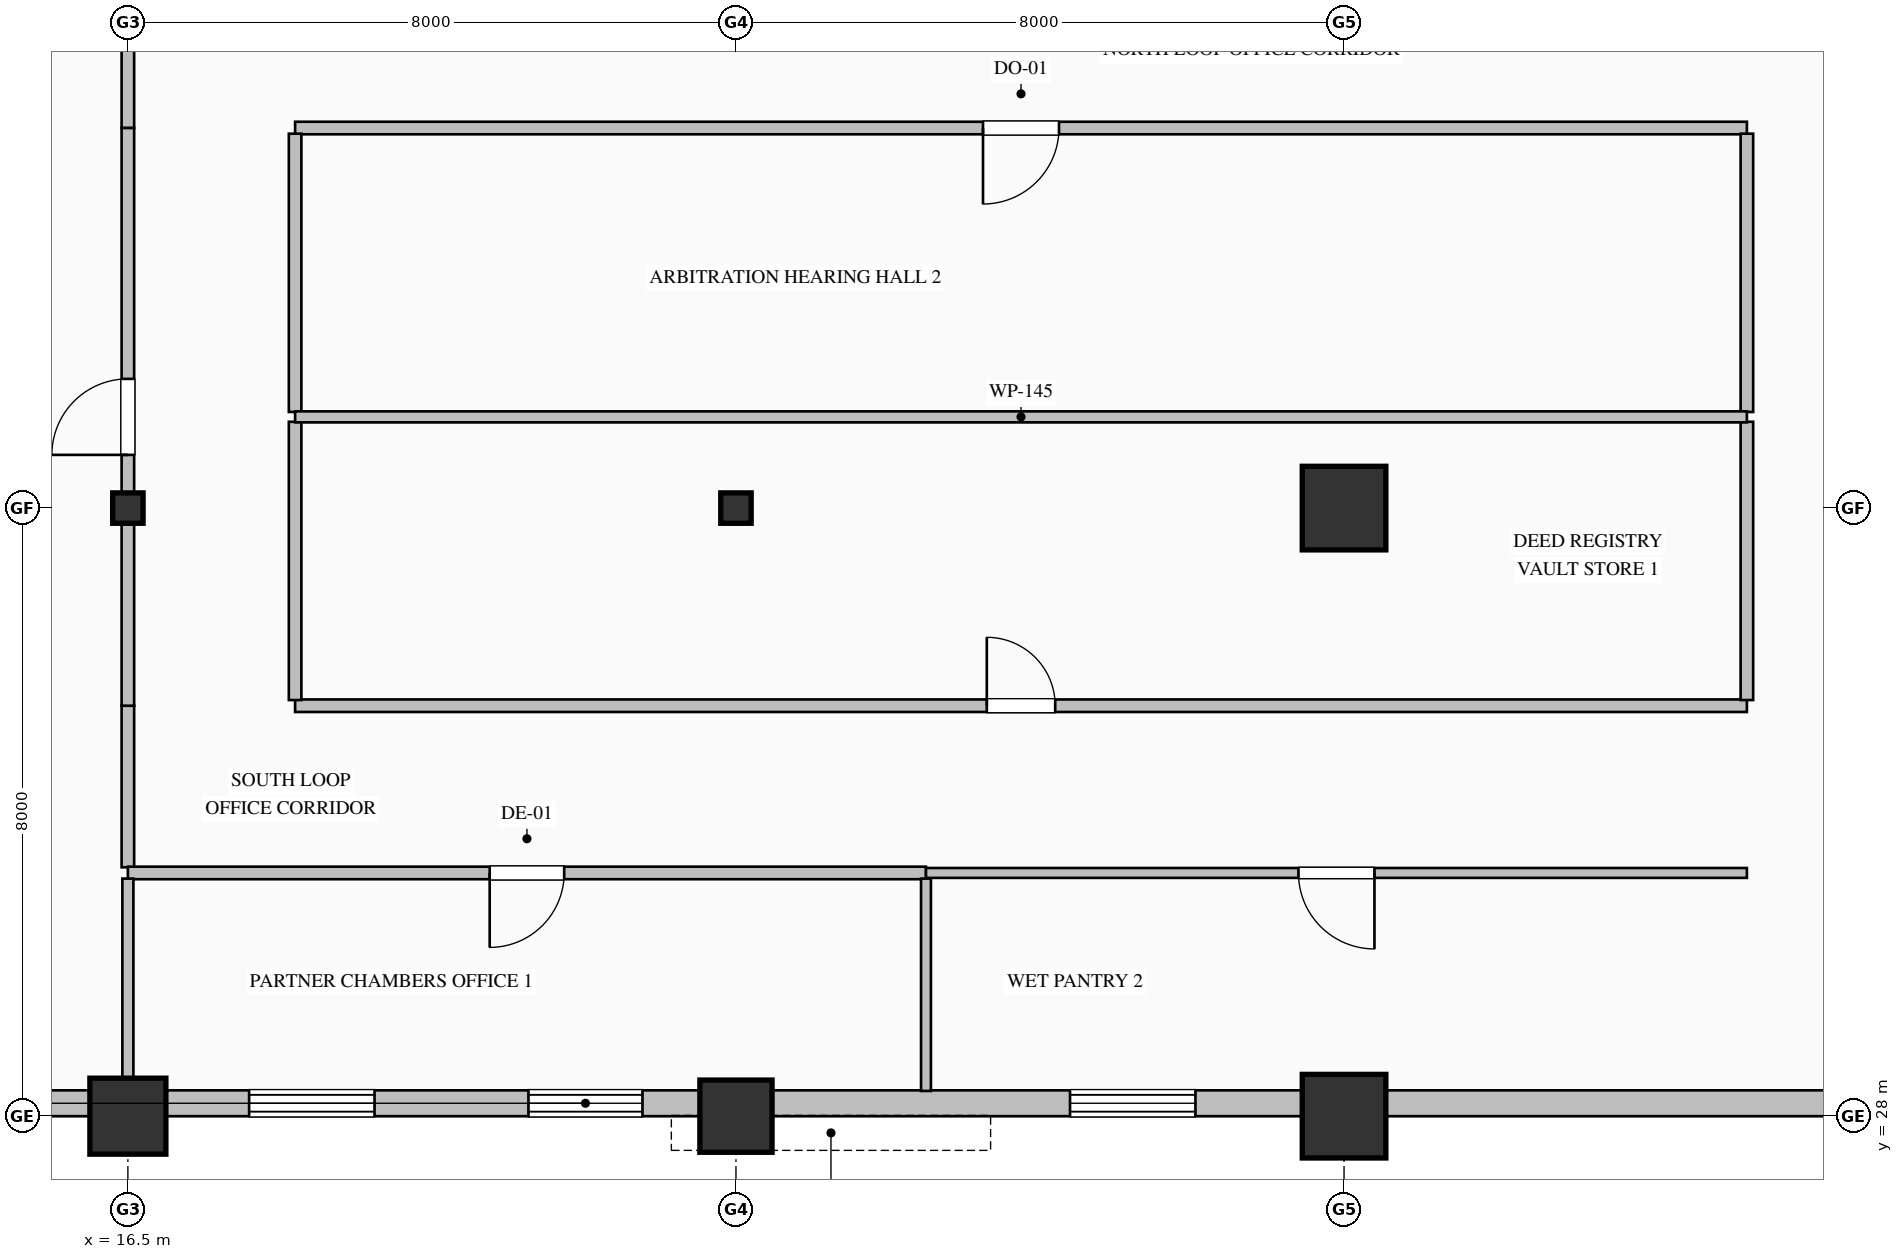
"""IFC4 building model, lengths in metres.
Left out: names, types, materials, properties, quantities, classifications, styles, units other than length and angle.
Written with IfcOpenShell. Run it as: python <this file> out.ifc"""

import sys

from ifc_helpers import new_model, si_unit, direction, frame, frame_2d, origin, origin_2d, place, context, subcontext, project, spatial, rectangle, hollow_rectangle, hollow_circle, i_section, extrude, element, fill, save


model = new_model("IFC4")
c1 = context("Model", 3, precision=1e-05, world=origin(), true_north=direction((0.0, 1.0)))
c2 = subcontext(c1, "Body", "Model", "MODEL_VIEW")
j1 = project(units=[si_unit("LENGTHUNIT", "METRE"), si_unit("PLANEANGLEUNIT", "RADIAN")], contexts=[c1])
p1 = place(None, origin())
s1 = spatial("IfcSite", under=j1, at=p1, CompositionType="ELEMENT")
p2 = place(p1, origin())
s2 = spatial("IfcBuilding", under=s1, at=p2, CompositionType="ELEMENT")
p3 = place(p2, frame((0.0, 0.0, 191.0)))
s3 = spatial("IfcBuildingStorey", under=s2, at=p3, CompositionType="ELEMENT", Elevation=191.0)
p4 = place(p3, frame((16.5, 28.0, 0.0), z_axis=(0.0, 0.0, 1.0), x_axis=(1.0, 0.0, 0.0)))
e1 = element("IfcColumn", 1, at=p4, inside=s3, PredefinedType="COLUMN", context=c2, shape_type="SweptSolid", body=[
    extrude(hollow_circle(Radius=0.5, WallThickness=0.036, at=origin_2d()), origin(), (0.0, 0.0, 1.0), 4.0),
])
p5 = place(p3, frame((16.5, 36.0, 0.0), z_axis=(0.0, 0.0, 1.0), x_axis=(1.0, 0.0, 0.0)))
e2 = element("IfcColumn", 2, at=p5, inside=s3, PredefinedType="COLUMN", context=c2, shape_type="SweptSolid", body=[
    extrude(i_section(OverallWidth=0.4, OverallDepth=0.4, WebThickness=0.013, FlangeThickness=0.021, FilletRadius=0.022, at=origin_2d()), origin(), (0.0, 0.0, 1.0), 4.0),
])
p6 = place(p3, frame((24.5, 28.0, 0.0), z_axis=(0.0, 0.0, 1.0), x_axis=(1.0, 0.0, 0.0)))
e3 = element("IfcColumn", 3, at=p6, inside=s3, PredefinedType="COLUMN", context=c2, shape_type="SweptSolid", body=[
    extrude(hollow_rectangle(XDim=0.95, YDim=0.95, WallThickness=0.036, at=origin_2d()), origin(), (0.0, 0.0, 1.0), 4.0),
])
p7 = place(p3, frame((24.5, 36.0, 0.0), z_axis=(0.0, 0.0, 1.0), x_axis=(1.0, 0.0, 0.0)))
e4 = element("IfcColumn", 4, at=p7, inside=s3, PredefinedType="COLUMN", context=c2, shape_type="SweptSolid", body=[
    extrude(i_section(OverallWidth=0.4, OverallDepth=0.4, WebThickness=0.013, FlangeThickness=0.021, FilletRadius=0.022, at=origin_2d()), origin(), (0.0, 0.0, 1.0), 4.0),
])
for number, where, z_axis, x_axis in (
    (5, (32.5, 28.0, 0.0), (0.0, 0.0, 1.0), (1.0, 0.0, 0.0)),
    (6, (32.5, 36.0, 0.0), (0.0, 0.0, 1.0), (1.0, 0.0, 0.0)),
):
    element("IfcColumn", number, at=place(p3, frame(where, z_axis=z_axis, x_axis=x_axis)), inside=s3, PredefinedType="COLUMN", context=c2, shape_type="SweptSolid", body=[
        extrude(hollow_rectangle(XDim=1.1, YDim=1.1, WallThickness=0.04, at=origin_2d()), origin(), (0.0, 0.0, 1.0), 4.0),
    ])
p8 = place(p3, frame((40.52, 28.17, 0.0), z_axis=(0.0, 0.0, 1.0), x_axis=(-1.0, 0.0, 0.0)))
e7 = element("IfcWall", 7, at=p8, inside=s3, PredefinedType="SOLIDWALL", context=c2, shape_type="SweptSolid", body=[
    extrude(rectangle(XDim=27.52, YDim=0.34, at=frame_2d((13.76, 0.0))), origin(), (0.0, 0.0, 1.0), 3.05),
])
p9 = place(p8, frame((9.975, 0.0, 0.85)))
e8 = element("IfcOpeningElement", 8, at=p9, cuts=e7, PredefinedType="OPENING", context=c2, shape_type="SweptSolid", body=[
    extrude(rectangle(XDim=1.65, YDim=1.95, at=frame_2d((0.825, 0.975))), frame((0.0, 0.18, 0.0), z_axis=(0.0, -1.0, 0.0), x_axis=(1.0, 0.0, 0.0)), (0.0, 0.0, 1.0), 0.36),
])
p10 = place(p8, frame((17.25, 0.0, 0.85)))
e9 = element("IfcOpeningElement", 9, at=p10, cuts=e7, PredefinedType="OPENING", context=c2, shape_type="SweptSolid", body=[
    extrude(rectangle(XDim=1.5, YDim=1.95, at=frame_2d((0.75, 0.975))), frame((0.0, 0.18, 0.0), z_axis=(0.0, -1.0, 0.0), x_axis=(1.0, 0.0, 0.0)), (0.0, 0.0, 1.0), 0.36),
])
p11 = place(p8, frame((20.775, 0.0, 0.85)))
e10 = element("IfcOpeningElement", 10, at=p11, cuts=e7, PredefinedType="OPENING", context=c2, shape_type="SweptSolid", body=[
    extrude(rectangle(XDim=1.65, YDim=1.95, at=frame_2d((0.825, 0.975))), frame((0.0, 0.18, 0.0), z_axis=(0.0, -1.0, 0.0), x_axis=(1.0, 0.0, 0.0)), (0.0, 0.0, 1.0), 0.36),
])
p12 = place(p3, frame((18.7, 33.4, 0.0), z_axis=(0.0, 0.0, 1.0), x_axis=(1.0, 0.0, 0.0)))
e11 = element("IfcWall", 11, at=p12, inside=s3, PredefinedType="PARTITIONING", context=c2, shape_type="SweptSolid", body=[
    extrude(rectangle(XDim=19.1, YDim=0.165, at=frame_2d((9.55, 0.0))), origin(), (0.0, 0.0, 1.0), 3.65),
])
p13 = place(p12, frame((9.1, 0.0, 0.0)))
e12 = element("IfcOpeningElement", 12, at=p13, cuts=e11, PredefinedType="OPENING", context=c2, shape_type="SweptSolid", body=[
    extrude(rectangle(XDim=0.9, YDim=2.15, at=frame_2d((0.45, 1.075))), frame((0.0, 0.093, 0.0), z_axis=(0.0, -1.0, 0.0), x_axis=(1.0, 0.0, 0.0)), (0.0, 0.0, 1.0), 0.185),
])
p14 = place(p3, frame((16.5, 31.274, 0.0), z_axis=(0.0, 0.0, 1.0), x_axis=(0.0, 1.0, 0.0)))
e13 = element("IfcWall", 13, at=p14, inside=s3, PredefinedType="PARTITIONING", context=c2, shape_type="SweptSolid", body=[
    extrude(rectangle(XDim=2.125, YDim=0.165, at=frame_2d((1.063, 0.0))), origin(), (0.0, 0.0, 1.0), 3.042),
])
p15 = place(p3, frame((27.0, 31.2, 0.0), z_axis=(0.0, 0.0, 1.0), x_axis=(-1.0, 0.0, 0.0)))
e14 = element("IfcWall", 14, at=p15, inside=s3, PredefinedType="PARTITIONING", context=c2, shape_type="SweptSolid", body=[
    extrude(rectangle(XDim=10.5, YDim=0.165, at=frame_2d((5.25, 0.0))), origin(), (0.0, 0.0, 1.0), 3.65),
])
p16 = place(p15, frame((4.76, 0.0, 0.0)))
e15 = element("IfcOpeningElement", 15, at=p16, cuts=e14, PredefinedType="OPENING", context=c2, shape_type="SweptSolid", body=[
    extrude(rectangle(XDim=0.98, YDim=2.25, at=frame_2d((0.49, 1.125))), frame((0.0, 0.093, 0.0), z_axis=(0.0, -1.0, 0.0), x_axis=(1.0, 0.0, 0.0)), (0.0, 0.0, 1.0), 0.185),
])
p17 = place(p3, frame((37.8, 31.2, 0.0), z_axis=(0.0, 0.0, 1.0), x_axis=(-1.0, 0.0, 0.0)))
e16 = element("IfcWall", 16, at=p17, inside=s3, PredefinedType="PARTITIONING", context=c2, shape_type="SweptSolid", body=[
    extrude(rectangle(XDim=10.8, YDim=0.13, at=frame_2d((5.4, 0.0))), origin(), (0.0, 0.0, 1.0), 3.65),
])
p18 = place(p17, frame((4.9, 0.0, 0.0)))
e17 = element("IfcOpeningElement", 17, at=p18, cuts=e16, PredefinedType="OPENING", context=c2, shape_type="SweptSolid", body=[
    extrude(rectangle(XDim=1.0, YDim=2.15, at=frame_2d((0.5, 1.075))), frame((0.0, 0.075, 0.0), z_axis=(0.0, -1.0, 0.0), x_axis=(1.0, 0.0, 0.0)), (0.0, 0.0, 1.0), 0.15),
])
p19 = place(p3, frame((37.8, 41.0, 0.0), z_axis=(0.0, 0.0, 1.0), x_axis=(-1.0, 0.0, 0.0)))
e18 = element("IfcWall", 18, at=p19, inside=s3, PredefinedType="PARTITIONING", context=c2, shape_type="SweptSolid", body=[
    extrude(rectangle(XDim=19.1, YDim=0.165, at=frame_2d((9.55, 0.0))), origin(), (0.0, 0.0, 1.0), 3.65),
])
p20 = place(p19, frame((9.05, 0.0, 0.0)))
e19 = element("IfcOpeningElement", 19, at=p20, cuts=e18, PredefinedType="OPENING", context=c2, shape_type="SweptSolid", body=[
    extrude(rectangle(XDim=1.0, YDim=2.15, at=frame_2d((0.5, 1.075))), frame((0.0, 0.093, 0.0), z_axis=(0.0, -1.0, 0.0), x_axis=(1.0, 0.0, 0.0)), (0.0, 0.0, 1.0), 0.185),
])
p21 = place(p3, frame((16.5, 41.0, 0.0), z_axis=(0.0, 0.0, 1.0), x_axis=(0.0, 1.0, 0.0)))
e20 = element("IfcWall", 20, at=p21, inside=s3, PredefinedType="PARTITIONING", context=c2, shape_type="SweptSolid", body=[
    extrude(rectangle(XDim=2.125, YDim=0.165, at=frame_2d((1.063, 0.0))), origin(), (0.0, 0.0, 1.0), 3.042),
])
p22 = place(p3, frame((18.7, 37.135, 0.0), z_axis=(0.0, 0.0, 1.0), x_axis=(0.0, -1.0, 0.0)))
e21 = element("IfcWall", 21, at=p22, inside=s3, PredefinedType="PARTITIONING", context=c2, shape_type="SweptSolid", body=[
    extrude(rectangle(XDim=3.661, YDim=0.165, at=frame_2d((1.831, 0.0))), origin(), (0.0, 0.0, 1.0), 3.65),
])
p23 = place(p3, frame((18.7, 40.926, 0.0), z_axis=(0.0, 0.0, 1.0), x_axis=(0.0, -1.0, 0.0)))
e22 = element("IfcWall", 22, at=p23, inside=s3, PredefinedType="PARTITIONING", context=c2, shape_type="SweptSolid", body=[
    extrude(rectangle(XDim=3.661, YDim=0.165, at=frame_2d((1.831, 0.0))), origin(), (0.0, 0.0, 1.0), 3.65),
])
p24 = place(p3, frame((16.5, 33.4, 0.0), z_axis=(0.0, 0.0, 1.0), x_axis=(0.0, 1.0, 0.0)))
e23 = element("IfcWall", 23, at=p24, inside=s3, PredefinedType="PARTITIONING", context=c2, shape_type="SweptSolid", body=[
    extrude(rectangle(XDim=7.6, YDim=0.165, at=frame_2d((3.8, 0.0))), origin(), (0.0, 0.0, 1.0), 3.042),
])
p25 = place(p24, frame((3.3, 0.0, 0.0)))
e24 = element("IfcOpeningElement", 24, at=p25, cuts=e23, PredefinedType="OPENING", context=c2, shape_type="SweptSolid", body=[
    extrude(rectangle(XDim=1.0, YDim=2.15, at=frame_2d((0.5, 1.075))), frame((0.0, 0.093, 0.0), z_axis=(0.0, -1.0, 0.0), x_axis=(1.0, 0.0, 0.0)), (0.0, 0.0, 1.0), 0.185),
])
p26 = place(p3, frame((37.8, 33.475, 0.0), z_axis=(0.0, 0.0, 1.0), x_axis=(0.0, 1.0, 0.0)))
e25 = element("IfcWall", 25, at=p26, inside=s3, PredefinedType="PARTITIONING", context=c2, shape_type="SweptSolid", body=[
    extrude(rectangle(XDim=3.661, YDim=0.165, at=frame_2d((1.831, 0.0))), origin(), (0.0, 0.0, 1.0), 3.65),
])
p27 = place(p3, frame((37.8, 37.264, 0.0), z_axis=(0.0, 0.0, 1.0), x_axis=(0.0, 1.0, 0.0)))
e26 = element("IfcWall", 26, at=p27, inside=s3, PredefinedType="PARTITIONING", context=c2, shape_type="SweptSolid", body=[
    extrude(rectangle(XDim=3.661, YDim=0.165, at=frame_2d((1.831, 0.0))), origin(), (0.0, 0.0, 1.0), 3.65),
])
p28 = place(p3, frame((18.7, 37.2, 0.0), z_axis=(0.0, 0.0, 1.0), x_axis=(1.0, 0.0, 0.0)))
e27 = element("IfcWall", 27, at=p28, inside=s3, PredefinedType="PARTITIONING", context=c2, shape_type="SweptSolid", body=[
    extrude(rectangle(XDim=19.1, YDim=0.145, at=frame_2d((9.55, 0.0))), origin(), (0.0, 0.0, 1.0), 3.65),
])
p29 = place(p3, frame((16.5, 31.125, 0.0), z_axis=(0.0, 0.0, 1.0), x_axis=(0.0, -1.0, 0.0)))
e28 = element("IfcWall", 28, at=p29, inside=s3, PredefinedType="PARTITIONING", context=c2, shape_type="SweptSolid", body=[
    extrude(rectangle(XDim=2.793, YDim=0.145, at=frame_2d((1.397, 0.0))), origin(), (0.0, 0.0, 1.0), 3.042),
])
p30 = place(p3, frame((27.0, 31.125, 0.0), z_axis=(0.0, 0.0, 1.0), x_axis=(0.0, -1.0, 0.0)))
e29 = element("IfcWall", 29, at=p30, inside=s3, PredefinedType="PARTITIONING", context=c2, shape_type="SweptSolid", body=[
    extrude(rectangle(XDim=2.793, YDim=0.13, at=frame_2d((1.397, 0.0))), origin(), (0.0, 0.0, 1.0), 3.65),
])
p31 = place(p9, origin())
e30 = element("IfcWindow", 30, at=p31, inside=s3, PartitioningType="DOUBLE_PANEL_VERTICAL", PredefinedType="WINDOW", context=c2, shape_type="SweptSolid", body=[
    extrude(rectangle(XDim=1.65, YDim=1.95, at=frame_2d((0.825, 0.975))), frame((0.0, 0.15, 0.0), z_axis=(0.0, -1.0, 0.0), x_axis=(1.0, 0.0, 0.0)), (0.0, 0.0, 1.0), 0.06),
])
fill(e8, e30)
p32 = place(p10, origin())
e31 = element("IfcWindow", 31, at=p32, inside=s3, PartitioningType="DOUBLE_PANEL_VERTICAL", PredefinedType="WINDOW", context=c2, shape_type="SweptSolid", body=[
    extrude(rectangle(XDim=1.5, YDim=1.95, at=frame_2d((0.75, 0.975))), frame((0.0, 0.15, 0.0), z_axis=(0.0, -1.0, 0.0), x_axis=(1.0, 0.0, 0.0)), (0.0, 0.0, 1.0), 0.06),
])
fill(e9, e31)
p33 = place(p11, origin())
e32 = element("IfcWindow", 32, at=p33, inside=s3, PartitioningType="DOUBLE_PANEL_VERTICAL", PredefinedType="WINDOW", context=c2, shape_type="SweptSolid", body=[
    extrude(rectangle(XDim=1.65, YDim=1.95, at=frame_2d((0.825, 0.975))), frame((0.0, 0.15, 0.0), z_axis=(0.0, -1.0, 0.0), x_axis=(1.0, 0.0, 0.0)), (0.0, 0.0, 1.0), 0.06),
])
fill(e10, e32)
p34 = place(p13, origin())
e33 = element("IfcDoor", 33, at=p34, inside=s3, OperationType="SINGLE_SWING_LEFT", PredefinedType="DOOR", context=c2, shape_type="SweptSolid", body=[
    extrude(rectangle(XDim=0.9, YDim=2.15, at=frame_2d((0.45, 1.075))), frame((0.0, 0.025, 0.0), z_axis=(0.0, -1.0, 0.0), x_axis=(1.0, 0.0, 0.0)), (0.0, 0.0, 1.0), 0.05),
])
fill(e12, e33)
p35 = place(p20, origin())
e34 = element("IfcDoor", 34, at=p35, inside=s3, OperationType="SINGLE_SWING_RIGHT", PredefinedType="DOOR", context=c2, shape_type="SweptSolid", body=[
    extrude(rectangle(XDim=1.0, YDim=2.15, at=frame_2d((0.5, 1.075))), frame((0.0, 0.025, 0.0), z_axis=(0.0, -1.0, 0.0), x_axis=(1.0, 0.0, 0.0)), (0.0, 0.0, 1.0), 0.05),
])
fill(e19, e34)
p36 = place(p25, origin())
e35 = element("IfcDoor", 35, at=p36, inside=s3, OperationType="SINGLE_SWING_LEFT", PredefinedType="DOOR", context=c2, shape_type="SweptSolid", body=[
    extrude(rectangle(XDim=1.0, YDim=2.15, at=frame_2d((0.5, 1.075))), frame((0.0, 0.025, 0.0), z_axis=(0.0, -1.0, 0.0), x_axis=(1.0, 0.0, 0.0)), (0.0, 0.0, 1.0), 0.05),
])
fill(e24, e35)
p37 = place(p16, origin())
e36 = element("IfcDoor", 36, at=p37, inside=s3, OperationType="SINGLE_SWING_RIGHT", PredefinedType="DOOR", context=c2, shape_type="SweptSolid", body=[
    extrude(rectangle(XDim=0.98, YDim=2.25, at=frame_2d((0.49, 1.125))), frame((0.0, 0.025, 0.0), z_axis=(0.0, -1.0, 0.0), x_axis=(1.0, 0.0, 0.0)), (0.0, 0.0, 1.0), 0.05),
])
fill(e15, e36)
p38 = place(p18, origin())
e37 = element("IfcDoor", 37, at=p38, inside=s3, OperationType="SINGLE_SWING_LEFT", PredefinedType="DOOR", context=c2, shape_type="SweptSolid", body=[
    extrude(rectangle(XDim=1.0, YDim=2.15, at=frame_2d((0.5, 1.075))), frame((0.0, 0.025, 0.0), z_axis=(0.0, -1.0, 0.0), x_axis=(1.0, 0.0, 0.0)), (0.0, 0.0, 1.0), 0.05),
])
fill(e17, e37)
save(model, sys.argv[1])
